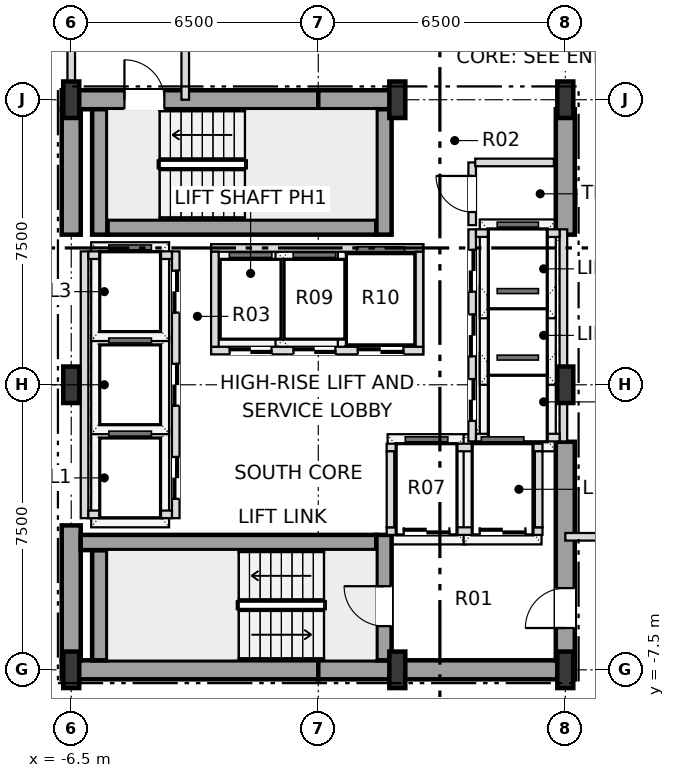
"""IFC4 building model, lengths in metres.
Left out: names, types, materials, properties, quantities, classifications, styles, units other than length and angle.
Written with IfcOpenShell. Run it as: python <this file> out.ifc"""

import sys

from ifc_helpers import new_model, si_unit, direction, frame, frame_2d, origin, origin_2d, place, context, subcontext, project, spatial, rectangle, i_section, extrude, element, fill, save


model = new_model("IFC4")
c1 = context("Model", 3, precision=1e-05, world=origin(), true_north=direction((0.0, 1.0)))
c2 = subcontext(c1, "Body", "Model", "MODEL_VIEW")
j1 = project(units=[si_unit("LENGTHUNIT", "METRE"), si_unit("PLANEANGLEUNIT", "RADIAN")], contexts=[c1])
p1 = place(None, origin())
s1 = spatial("IfcSite", under=j1, at=p1, CompositionType="ELEMENT")
p2 = place(p1, origin())
s2 = spatial("IfcBuilding", under=s1, at=p2, CompositionType="ELEMENT")
p3 = place(p2, origin())
s3 = spatial("IfcBuildingStorey", under=s2, at=p3, CompositionType="ELEMENT", Elevation=0.0)
for number, where, z_axis, x_axis in (
    (1, (-6.5, -7.5, 0.0), (0.0, 0.0, 1.0), (1.0, 0.0, 0.0)),
    (2, (2.08, -7.5, 0.0), (0.0, 0.0, 1.0), (1.0, 0.0, 0.0)),
    (3, (6.5, -7.5, 0.0), (0.0, 0.0, 1.0), (1.0, 0.0, 0.0)),
    (4, (-6.5, 0.0, 0.0), (0.0, 0.0, 1.0), (1.0, 0.0, 0.0)),
    (5, (6.5, 0.0, 0.0), (0.0, 0.0, 1.0), (1.0, 0.0, 0.0)),
    (6, (-6.5, 7.5, 0.0), (0.0, 0.0, 1.0), (1.0, 0.0, 0.0)),
    (7, (2.08, 7.5, 0.0), (0.0, 0.0, 1.0), (1.0, 0.0, 0.0)),
    (8, (6.5, 7.5, 0.0), (0.0, 0.0, 1.0), (1.0, 0.0, 0.0)),
):
    element("IfcColumn", number, at=place(p3, frame(where, z_axis=z_axis, x_axis=x_axis)), inside=s3, PredefinedType="COLUMN", context=c2, shape_type="SweptSolid", body=[
        extrude(i_section(OverallWidth=0.42, OverallDepth=0.96, WebThickness=0.022, FlangeThickness=0.034, at=origin_2d()), origin(), (0.0, 0.0, 1.0), 6.0),
    ])
for number, where, z_axis, x_axis in (
    (9, (-6.75, -7.5, 0.0), (0.0, 0.0, 1.0), (1.0, 0.0, 0.0)),
    (10, (0.0, -7.5, 0.0), (0.0, 0.0, 1.0), (1.0, 0.0, 0.0)),
):
    element("IfcWall", number, at=place(p3, frame(where, z_axis=z_axis, x_axis=x_axis)), inside=s3, PredefinedType="SHEAR", context=c2, shape_type="SweptSolid", body=[
        extrude(rectangle(XDim=6.75, YDim=0.5, at=frame_2d((3.375, 0.0))), origin(), (0.0, 0.0, 1.0), 5.72),
    ])
p4 = place(p3, frame((-6.75, 7.5, 0.0), z_axis=(0.0, 0.0, 1.0), x_axis=(1.0, 0.0, 0.0)))
e11 = element("IfcWall", 11, at=p4, inside=s3, PredefinedType="SHEAR", context=c2, shape_type="SweptSolid", body=[
    extrude(rectangle(XDim=6.75, YDim=0.5, at=frame_2d((3.375, 0.0))), origin(), (0.0, 0.0, 1.0), 5.72),
])
p5 = place(p4, frame((1.65, 0.0, 0.0)))
e12 = element("IfcOpeningElement", 12, at=p5, cuts=e11, PredefinedType="OPENING", context=c2, shape_type="SweptSolid", body=[
    extrude(rectangle(XDim=1.05, YDim=2.15, at=frame_2d((0.525, 1.075))), frame((0.0, 0.26, 0.0), z_axis=(0.0, -1.0, 0.0), x_axis=(1.0, 0.0, 0.0)), (0.0, 0.0, 1.0), 0.52),
])
p6 = place(p3, frame((0.0, 7.5, 0.0), z_axis=(0.0, 0.0, 1.0), x_axis=(1.0, 0.0, 0.0)))
e13 = element("IfcWall", 13, at=p6, inside=s3, PredefinedType="SHEAR", context=c2, shape_type="SweptSolid", body=[
    extrude(rectangle(XDim=2.08, YDim=0.5, at=frame_2d((1.04, 0.0))), origin(), (0.0, 0.0, 1.0), 5.72),
])
p7 = place(p3, frame((-6.5, -7.25, 0.0), z_axis=(0.0, 0.0, 1.0), x_axis=(0.0, 1.0, 0.0)))
e14 = element("IfcWall", 14, at=p7, inside=s3, PredefinedType="SHEAR", context=c2, shape_type="SweptSolid", body=[
    extrude(rectangle(XDim=3.55, YDim=0.5, at=frame_2d((1.775, 0.0))), origin(), (0.0, 0.0, 1.0), 5.72),
])
p8 = place(p3, frame((-6.5, 3.95, 0.0), z_axis=(0.0, 0.0, 1.0), x_axis=(0.0, 1.0, 0.0)))
e15 = element("IfcWall", 15, at=p8, inside=s3, PredefinedType="SHEAR", context=c2, shape_type="SweptSolid", body=[
    extrude(rectangle(XDim=3.3, YDim=0.5, at=frame_2d((1.65, 0.0))), origin(), (0.0, 0.0, 1.0), 5.72),
])
p9 = place(p3, frame((6.5, -7.25, 0.0), z_axis=(0.0, 0.0, 1.0), x_axis=(0.0, 1.0, 0.0)))
e16 = element("IfcWall", 16, at=p9, inside=s3, PredefinedType="SHEAR", context=c2, shape_type="SweptSolid", body=[
    extrude(rectangle(XDim=5.75, YDim=0.5, at=frame_2d((2.875, 0.0))), origin(), (0.0, 0.0, 1.0), 5.72),
])
p10 = place(p9, frame((0.85, 0.0, 0.0)))
e17 = element("IfcOpeningElement", 17, at=p10, cuts=e16, PredefinedType="OPENING", context=c2, shape_type="SweptSolid", body=[
    extrude(rectangle(XDim=1.05, YDim=2.15, at=frame_2d((0.525, 1.075))), frame((0.0, 0.26, 0.0), z_axis=(0.0, -1.0, 0.0), x_axis=(1.0, 0.0, 0.0)), (0.0, 0.0, 1.0), 0.52),
])
p11 = place(p3, frame((6.5, 3.95, 0.0), z_axis=(0.0, 0.0, 1.0), x_axis=(0.0, 1.0, 0.0)))
e18 = element("IfcWall", 18, at=p11, inside=s3, PredefinedType="SHEAR", context=c2, shape_type="SweptSolid", body=[
    extrude(rectangle(XDim=3.3, YDim=0.5, at=frame_2d((1.65, 0.0))), origin(), (0.0, 0.0, 1.0), 5.72),
])
p12 = place(p3, frame((-5.75, -7.25, 0.0), z_axis=(0.0, 0.0, 1.0), x_axis=(0.0, 1.0, 0.0)))
e19 = element("IfcWall", 19, at=p12, inside=s3, PredefinedType="SHEAR", context=c2, shape_type="SweptSolid", body=[
    extrude(rectangle(XDim=2.9, YDim=0.4, at=frame_2d((1.45, 0.0))), origin(), (0.0, 0.0, 1.0), 5.72),
])
p13 = place(p3, frame((-6.25, -4.15, 0.0), z_axis=(0.0, 0.0, 1.0), x_axis=(1.0, 0.0, 0.0)))
e20 = element("IfcWall", 20, at=p13, inside=s3, PredefinedType="SHEAR", context=c2, shape_type="SweptSolid", body=[
    extrude(rectangle(XDim=7.78, YDim=0.4, at=frame_2d((3.89, 0.0))), origin(), (0.0, 0.0, 1.0), 5.72),
])
p14 = place(p3, frame((1.73, -7.25, 0.0), z_axis=(0.0, 0.0, 1.0), x_axis=(0.0, 1.0, 0.0)))
e21 = element("IfcWall", 21, at=p14, inside=s3, PredefinedType="SHEAR", context=c2, shape_type="SweptSolid", body=[
    extrude(rectangle(XDim=3.3, YDim=0.4, at=frame_2d((1.65, 0.0))), origin(), (0.0, 0.0, 1.0), 5.72),
])
p15 = place(p14, frame((0.9, 0.0, 0.0)))
e22 = element("IfcOpeningElement", 22, at=p15, cuts=e21, PredefinedType="OPENING", context=c2, shape_type="SweptSolid", body=[
    extrude(rectangle(XDim=1.05, YDim=2.15, at=frame_2d((0.525, 1.075))), frame((0.0, 0.21, 0.0), z_axis=(0.0, -1.0, 0.0), x_axis=(1.0, 0.0, 0.0)), (0.0, 0.0, 1.0), 0.42),
])
p16 = place(p3, frame((-5.55, 4.15, 0.0), z_axis=(0.0, 0.0, 1.0), x_axis=(1.0, 0.0, 0.0)))
e23 = element("IfcWall", 23, at=p16, inside=s3, PredefinedType="SHEAR", context=c2, shape_type="SweptSolid", body=[
    extrude(rectangle(XDim=7.08, YDim=0.4, at=frame_2d((3.54, 0.0))), origin(), (0.0, 0.0, 1.0), 5.72),
])
for number, where, z_axis, x_axis in (
    (24, (1.73, 3.95, 0.0), (0.0, 0.0, 1.0), (0.0, 1.0, 0.0)),
    (25, (-5.75, 3.95, 0.0), (0.0, 0.0, 1.0), (0.0, 1.0, 0.0)),
):
    element("IfcWall", number, at=place(p3, frame(where, z_axis=z_axis, x_axis=x_axis)), inside=s3, PredefinedType="SHEAR", context=c2, shape_type="SweptSolid", body=[
        extrude(rectangle(XDim=3.3, YDim=0.4, at=frame_2d((1.65, 0.0))), origin(), (0.0, 0.0, 1.0), 5.72),
    ])
p17 = place(p3, frame((-3.75, -3.51, 0.0), z_axis=(0.0, 0.0, 1.0), x_axis=(0.0, 1.0, 0.0)))
e26 = element("IfcWall", 26, at=p17, inside=s3, PredefinedType="SOLIDWALL", context=c2, shape_type="SweptSolid", body=[
    extrude(rectangle(XDim=7.02, YDim=0.2, at=frame_2d((3.51, 0.0))), origin(), (0.0, 0.0, 1.0), 5.72),
])
p18 = place(p17, frame((0.51, 0.0, 0.0)))
e27 = element("IfcOpeningElement", 27, at=p18, cuts=e26, PredefinedType="OPENING", context=c2, shape_type="SweptSolid", body=[
    extrude(rectangle(XDim=1.1, YDim=2.15, at=frame_2d((0.55, 1.075))), frame((0.0, 0.11, 0.0), z_axis=(0.0, -1.0, 0.0), x_axis=(1.0, 0.0, 0.0)), (0.0, 0.0, 1.0), 0.22),
])
p19 = place(p17, frame((2.96, 0.0, 0.0)))
e28 = element("IfcOpeningElement", 28, at=p19, cuts=e26, PredefinedType="OPENING", context=c2, shape_type="SweptSolid", body=[
    extrude(rectangle(XDim=1.1, YDim=2.15, at=frame_2d((0.55, 1.075))), frame((0.0, 0.11, 0.0), z_axis=(0.0, -1.0, 0.0), x_axis=(1.0, 0.0, 0.0)), (0.0, 0.0, 1.0), 0.22),
])
p20 = place(p17, frame((5.41, 0.0, 0.0)))
e29 = element("IfcOpeningElement", 29, at=p20, cuts=e26, PredefinedType="OPENING", context=c2, shape_type="SweptSolid", body=[
    extrude(rectangle(XDim=1.1, YDim=2.15, at=frame_2d((0.55, 1.075))), frame((0.0, 0.11, 0.0), z_axis=(0.0, -1.0, 0.0), x_axis=(1.0, 0.0, 0.0)), (0.0, 0.0, 1.0), 0.22),
])
p21 = place(p3, frame((-6.15, -3.51, 0.0), z_axis=(0.0, 0.0, 1.0), x_axis=(0.0, 1.0, 0.0)))
e30 = element("IfcWall", 30, at=p21, inside=s3, PredefinedType="SOLIDWALL", context=c2, shape_type="SweptSolid", body=[
    extrude(rectangle(XDim=7.02, YDim=0.2, at=frame_2d((3.51, 0.0))), origin(), (0.0, 0.0, 1.0), 5.72),
])
for number, where, z_axis, x_axis in (
    (31, (-6.05, -3.41, 0.0), (0.0, 0.0, 1.0), (1.0, 0.0, 0.0)),
    (32, (-6.05, 3.41, 0.0), (0.0, 0.0, 1.0), (1.0, 0.0, 0.0)),
):
    element("IfcWall", number, at=place(p3, frame(where, z_axis=z_axis, x_axis=x_axis)), inside=s3, PredefinedType="SOLIDWALL", context=c2, shape_type="SweptSolid", body=[
        extrude(rectangle(XDim=2.2, YDim=0.2, at=frame_2d((1.1, 0.0))), origin(), (0.0, 0.0, 1.0), 5.72),
    ])
p22 = place(p3, frame((4.05, -1.49, 0.0), z_axis=(0.0, 0.0, 1.0), x_axis=(0.0, 1.0, 0.0)))
e33 = element("IfcWall", 33, at=p22, inside=s3, PredefinedType="SOLIDWALL", context=c2, shape_type="SweptSolid", body=[
    extrude(rectangle(XDim=5.58, YDim=0.2, at=frame_2d((2.79, 0.0))), origin(), (0.0, 0.0, 1.0), 5.72),
])
p23 = place(p22, frame((0.54, 0.0, 0.0)))
e34 = element("IfcOpeningElement", 34, at=p23, cuts=e33, PredefinedType="OPENING", context=c2, shape_type="SweptSolid", body=[
    extrude(rectangle(XDim=1.1, YDim=2.15, at=frame_2d((0.55, 1.075))), frame((0.0, 0.11, 0.0), z_axis=(0.0, -1.0, 0.0), x_axis=(1.0, 0.0, 0.0)), (0.0, 0.0, 1.0), 0.22),
])
p24 = place(p22, frame((2.24, 0.0, 0.0)))
e35 = element("IfcOpeningElement", 35, at=p24, cuts=e33, PredefinedType="OPENING", context=c2, shape_type="SweptSolid", body=[
    extrude(rectangle(XDim=1.1, YDim=2.15, at=frame_2d((0.55, 1.075))), frame((0.0, 0.11, 0.0), z_axis=(0.0, -1.0, 0.0), x_axis=(1.0, 0.0, 0.0)), (0.0, 0.0, 1.0), 0.22),
])
p25 = place(p22, frame((3.94, 0.0, 0.0)))
e36 = element("IfcOpeningElement", 36, at=p25, cuts=e33, PredefinedType="OPENING", context=c2, shape_type="SweptSolid", body=[
    extrude(rectangle(XDim=1.1, YDim=2.15, at=frame_2d((0.55, 1.075))), frame((0.0, 0.11, 0.0), z_axis=(0.0, -1.0, 0.0), x_axis=(1.0, 0.0, 0.0)), (0.0, 0.0, 1.0), 0.22),
])
p26 = place(p3, frame((6.45, -1.49, 0.0), z_axis=(0.0, 0.0, 1.0), x_axis=(0.0, 1.0, 0.0)))
e37 = element("IfcWall", 37, at=p26, inside=s3, PredefinedType="SOLIDWALL", context=c2, shape_type="SweptSolid", body=[
    extrude(rectangle(XDim=5.58, YDim=0.2, at=frame_2d((2.79, 0.0))), origin(), (0.0, 0.0, 1.0), 5.01),
])
for number, where, z_axis, x_axis in (
    (38, (4.15, -1.39, 0.0), (0.0, 0.0, 1.0), (1.0, 0.0, 0.0)),
    (39, (4.15, 3.99, 0.0), (0.0, 0.0, 1.0), (1.0, 0.0, 0.0)),
):
    element("IfcWall", number, at=place(p3, frame(where, z_axis=z_axis, x_axis=x_axis)), inside=s3, PredefinedType="SOLIDWALL", context=c2, shape_type="SweptSolid", body=[
        extrude(rectangle(XDim=2.2, YDim=0.2, at=frame_2d((1.1, 0.0))), origin(), (0.0, 0.0, 1.0), 5.72),
    ])
p27 = place(p3, frame((-2.82, 0.9, 0.0), z_axis=(0.0, 0.0, 1.0), x_axis=(1.0, 0.0, 0.0)))
e40 = element("IfcWall", 40, at=p27, inside=s3, PredefinedType="SOLIDWALL", context=c2, shape_type="SweptSolid", body=[
    extrude(rectangle(XDim=5.58, YDim=0.2, at=frame_2d((2.79, 0.0))), origin(), (0.0, 0.0, 1.0), 5.72),
])
p28 = place(p27, frame((0.49, 0.0, 0.0)))
e41 = element("IfcOpeningElement", 41, at=p28, cuts=e40, PredefinedType="OPENING", context=c2, shape_type="SweptSolid", body=[
    extrude(rectangle(XDim=1.1, YDim=2.15, at=frame_2d((0.55, 1.075))), frame((0.0, 0.11, 0.0), z_axis=(0.0, -1.0, 0.0), x_axis=(1.0, 0.0, 0.0)), (0.0, 0.0, 1.0), 0.22),
])
p29 = place(p27, frame((2.17, 0.0, 0.0)))
e42 = element("IfcOpeningElement", 42, at=p29, cuts=e40, PredefinedType="OPENING", context=c2, shape_type="SweptSolid", body=[
    extrude(rectangle(XDim=1.1, YDim=2.15, at=frame_2d((0.55, 1.075))), frame((0.0, 0.11, 0.0), z_axis=(0.0, -1.0, 0.0), x_axis=(1.0, 0.0, 0.0)), (0.0, 0.0, 1.0), 0.22),
])
p30 = place(p27, frame((3.86, 0.0, 0.0)))
e43 = element("IfcOpeningElement", 43, at=p30, cuts=e40, PredefinedType="OPENING", context=c2, shape_type="SweptSolid", body=[
    extrude(rectangle(XDim=1.2, YDim=2.2, at=frame_2d((0.6, 1.1))), frame((0.0, 0.11, 0.0), z_axis=(0.0, -1.0, 0.0), x_axis=(1.0, 0.0, 0.0)), (0.0, 0.0, 1.0), 0.22),
])
p31 = place(p3, frame((-2.82, 3.6, 0.0), z_axis=(0.0, 0.0, 1.0), x_axis=(1.0, 0.0, 0.0)))
e44 = element("IfcWall", 44, at=p31, inside=s3, PredefinedType="SOLIDWALL", context=c2, shape_type="SweptSolid", body=[
    extrude(rectangle(XDim=5.58, YDim=0.2, at=frame_2d((2.79, 0.0))), origin(), (0.0, 0.0, 1.0), 5.72),
])
for number, where, z_axis, x_axis in (
    (45, (-2.72, 1.0, 0.0), (0.0, 0.0, 1.0), (0.0, 1.0, 0.0)),
    (46, (2.66, 1.0, 0.0), (0.0, 0.0, 1.0), (0.0, 1.0, 0.0)),
):
    element("IfcWall", number, at=place(p3, frame(where, z_axis=z_axis, x_axis=x_axis)), inside=s3, PredefinedType="SOLIDWALL", context=c2, shape_type="SweptSolid", body=[
        extrude(rectangle(XDim=2.5, YDim=0.2, at=frame_2d((1.25, 0.0))), origin(), (0.0, 0.0, 1.0), 5.72),
    ])
p32 = place(p3, frame((1.8, -3.85, 0.0), z_axis=(0.0, 0.0, 1.0), x_axis=(1.0, 0.0, 0.0)))
e47 = element("IfcWall", 47, at=p32, inside=s3, PredefinedType="SOLIDWALL", context=c2, shape_type="SweptSolid", body=[
    extrude(rectangle(XDim=4.1, YDim=0.2, at=frame_2d((2.05, 0.0))), origin(), (0.0, 0.0, 1.0), 5.72),
])
p33 = place(p32, frame((0.45, 0.0, 0.0)))
e48 = element("IfcOpeningElement", 48, at=p33, cuts=e47, PredefinedType="OPENING", context=c2, shape_type="SweptSolid", body=[
    extrude(rectangle(XDim=1.2, YDim=2.2, at=frame_2d((0.6, 1.1))), frame((0.0, 0.11, 0.0), z_axis=(0.0, -1.0, 0.0), x_axis=(1.0, 0.0, 0.0)), (0.0, 0.0, 1.0), 0.22),
])
p34 = place(p32, frame((2.45, 0.0, 0.0)))
e49 = element("IfcOpeningElement", 49, at=p34, cuts=e47, PredefinedType="OPENING", context=c2, shape_type="SweptSolid", body=[
    extrude(rectangle(XDim=1.2, YDim=2.2, at=frame_2d((0.6, 1.1))), frame((0.0, 0.11, 0.0), z_axis=(0.0, -1.0, 0.0), x_axis=(1.0, 0.0, 0.0)), (0.0, 0.0, 1.0), 0.22),
])
p35 = place(p3, frame((1.8, -1.65, 0.0), z_axis=(0.0, 0.0, 1.0), x_axis=(1.0, 0.0, 0.0)))
e50 = element("IfcWall", 50, at=p35, inside=s3, PredefinedType="SOLIDWALL", context=c2, shape_type="SweptSolid", body=[
    extrude(rectangle(XDim=4.1, YDim=0.2, at=frame_2d((2.05, 0.0))), origin(), (0.0, 0.0, 1.0), 5.72),
])
for number, where, z_axis, x_axis in (
    (51, (1.9, -3.75, 0.0), (0.0, 0.0, 1.0), (0.0, 1.0, 0.0)),
    (52, (5.8, -3.75, 0.0), (0.0, 0.0, 1.0), (0.0, 1.0, 0.0)),
):
    element("IfcWall", number, at=place(p3, frame(where, z_axis=z_axis, x_axis=x_axis)), inside=s3, PredefinedType="SOLIDWALL", context=c2, shape_type="SweptSolid", body=[
        extrude(rectangle(XDim=2.0, YDim=0.2, at=frame_2d((1.0, 0.0))), origin(), (0.0, 0.0, 1.0), 5.72),
    ])
p36 = place(p3, frame((6.5, -4.0, 0.0), z_axis=(0.0, 0.0, 1.0), x_axis=(1.0, 0.0, 0.0)))
e53 = element("IfcWall", 53, at=p36, inside=s3, PredefinedType="SOLIDWALL", context=c2, shape_type="SweptSolid", body=[
    extrude(rectangle(XDim=2.0, YDim=0.2, at=frame_2d((1.0, 0.0))), origin(), (0.0, 0.0, 1.0), 5.01),
])
for number, where, z_axis, x_axis in (
    (54, (-6.5, 7.5, 0.0), (0.0, 0.0, 1.0), (0.0, 1.0, 0.0)),
    (55, (-3.5, 7.5, 0.0), (0.0, 0.0, 1.0), (0.0, 1.0, 0.0)),
):
    element("IfcWall", number, at=place(p3, frame(where, z_axis=z_axis, x_axis=x_axis)), inside=s3, PredefinedType="SOLIDWALL", context=c2, shape_type="SweptSolid", body=[
        extrude(rectangle(XDim=8.0, YDim=0.2, at=frame_2d((4.0, 0.0))), origin(), (0.0, 0.0, 1.0), 5.01),
    ])
p37 = place(p3, frame((4.05, 4.2, 0.0), z_axis=(0.0, 0.0, 1.0), x_axis=(0.0, 1.0, 0.0)))
e56 = element("IfcWall", 56, at=p37, inside=s3, PredefinedType="SOLIDWALL", context=c2, shape_type="SweptSolid", body=[
    extrude(rectangle(XDim=1.65, YDim=0.2, at=frame_2d((0.825, 0.0))), origin(), (0.0, 0.0, 1.0), 5.72),
])
p38 = place(p37, frame((0.345, 0.0, 0.0)))
e57 = element("IfcOpeningElement", 57, at=p38, cuts=e56, PredefinedType="OPENING", context=c2, shape_type="SweptSolid", body=[
    extrude(rectangle(XDim=0.95, YDim=2.15, at=frame_2d((0.475, 1.075))), frame((0.0, 0.11, 0.0), z_axis=(0.0, -1.0, 0.0), x_axis=(1.0, 0.0, 0.0)), (0.0, 0.0, 1.0), 0.22),
])
p39 = place(p3, frame((4.13, 5.85, 0.0), z_axis=(0.0, 0.0, 1.0), x_axis=(1.0, 0.0, 0.0)))
e58 = element("IfcWall", 58, at=p39, inside=s3, PredefinedType="SOLIDWALL", context=c2, shape_type="SweptSolid", body=[
    extrude(rectangle(XDim=2.07, YDim=0.2, at=frame_2d((1.035, 0.0))), origin(), (0.0, 0.0, 1.0), 5.72),
])
p40 = place(p10, origin())
e59 = element("IfcDoor", 59, at=p40, inside=s3, OperationType="SINGLE_SWING_LEFT", PredefinedType="DOOR", context=c2, shape_type="SweptSolid", body=[
    extrude(rectangle(XDim=1.05, YDim=2.15, at=frame_2d((0.525, 1.075))), frame((0.0, 0.025, 0.0), z_axis=(0.0, -1.0, 0.0), x_axis=(1.0, 0.0, 0.0)), (0.0, 0.0, 1.0), 0.05),
])
fill(e17, e59)
p41 = place(p15, origin())
e60 = element("IfcDoor", 60, at=p41, inside=s3, OperationType="SINGLE_SWING_RIGHT", PredefinedType="DOOR", context=c2, shape_type="SweptSolid", body=[
    extrude(rectangle(XDim=1.05, YDim=2.15, at=frame_2d((0.525, 1.075))), frame((0.0, 0.025, 0.0), z_axis=(0.0, -1.0, 0.0), x_axis=(1.0, 0.0, 0.0)), (0.0, 0.0, 1.0), 0.05),
])
fill(e22, e60)
p42 = place(p5, origin())
e61 = element("IfcDoor", 61, at=p42, inside=s3, OperationType="SINGLE_SWING_LEFT", PredefinedType="DOOR", context=c2, shape_type="SweptSolid", body=[
    extrude(rectangle(XDim=1.05, YDim=2.15, at=frame_2d((0.525, 1.075))), frame((0.0, 0.025, 0.0), z_axis=(0.0, -1.0, 0.0), x_axis=(1.0, 0.0, 0.0)), (0.0, 0.0, 1.0), 0.05),
])
fill(e12, e61)
p43 = place(p18, origin())
e62 = element("IfcDoor", 62, at=p43, inside=s3, OperationType="DOUBLE_DOOR_SLIDING", PredefinedType="DOOR", context=c2, shape_type="SweptSolid", body=[
    extrude(rectangle(XDim=1.1, YDim=2.15, at=frame_2d((0.55, 1.075))), frame((0.0, 0.025, 0.0), z_axis=(0.0, -1.0, 0.0), x_axis=(1.0, 0.0, 0.0)), (0.0, 0.0, 1.0), 0.05),
])
fill(e27, e62)
p44 = place(p19, origin())
e63 = element("IfcDoor", 63, at=p44, inside=s3, OperationType="DOUBLE_DOOR_SLIDING", PredefinedType="DOOR", context=c2, shape_type="SweptSolid", body=[
    extrude(rectangle(XDim=1.1, YDim=2.15, at=frame_2d((0.55, 1.075))), frame((0.0, 0.025, 0.0), z_axis=(0.0, -1.0, 0.0), x_axis=(1.0, 0.0, 0.0)), (0.0, 0.0, 1.0), 0.05),
])
fill(e28, e63)
p45 = place(p20, origin())
e64 = element("IfcDoor", 64, at=p45, inside=s3, OperationType="DOUBLE_DOOR_SLIDING", PredefinedType="DOOR", context=c2, shape_type="SweptSolid", body=[
    extrude(rectangle(XDim=1.1, YDim=2.15, at=frame_2d((0.55, 1.075))), frame((0.0, 0.025, 0.0), z_axis=(0.0, -1.0, 0.0), x_axis=(1.0, 0.0, 0.0)), (0.0, 0.0, 1.0), 0.05),
])
fill(e29, e64)
p46 = place(p23, origin())
e65 = element("IfcDoor", 65, at=p46, inside=s3, OperationType="DOUBLE_DOOR_SLIDING", PredefinedType="DOOR", context=c2, shape_type="SweptSolid", body=[
    extrude(rectangle(XDim=1.1, YDim=2.15, at=frame_2d((0.55, 1.075))), frame((0.0, 0.025, 0.0), z_axis=(0.0, -1.0, 0.0), x_axis=(1.0, 0.0, 0.0)), (0.0, 0.0, 1.0), 0.05),
])
fill(e34, e65)
p47 = place(p24, origin())
e66 = element("IfcDoor", 66, at=p47, inside=s3, OperationType="DOUBLE_DOOR_SLIDING", PredefinedType="DOOR", context=c2, shape_type="SweptSolid", body=[
    extrude(rectangle(XDim=1.1, YDim=2.15, at=frame_2d((0.55, 1.075))), frame((0.0, 0.025, 0.0), z_axis=(0.0, -1.0, 0.0), x_axis=(1.0, 0.0, 0.0)), (0.0, 0.0, 1.0), 0.05),
])
fill(e35, e66)
p48 = place(p25, origin())
e67 = element("IfcDoor", 67, at=p48, inside=s3, OperationType="DOUBLE_DOOR_SLIDING", PredefinedType="DOOR", context=c2, shape_type="SweptSolid", body=[
    extrude(rectangle(XDim=1.1, YDim=2.15, at=frame_2d((0.55, 1.075))), frame((0.0, 0.025, 0.0), z_axis=(0.0, -1.0, 0.0), x_axis=(1.0, 0.0, 0.0)), (0.0, 0.0, 1.0), 0.05),
])
fill(e36, e67)
p49 = place(p28, origin())
e68 = element("IfcDoor", 68, at=p49, inside=s3, OperationType="DOUBLE_DOOR_SLIDING", PredefinedType="DOOR", context=c2, shape_type="SweptSolid", body=[
    extrude(rectangle(XDim=1.1, YDim=2.15, at=frame_2d((0.55, 1.075))), frame((0.0, 0.025, 0.0), z_axis=(0.0, -1.0, 0.0), x_axis=(1.0, 0.0, 0.0)), (0.0, 0.0, 1.0), 0.05),
])
fill(e41, e68)
p50 = place(p29, origin())
e69 = element("IfcDoor", 69, at=p50, inside=s3, OperationType="DOUBLE_DOOR_SLIDING", PredefinedType="DOOR", context=c2, shape_type="SweptSolid", body=[
    extrude(rectangle(XDim=1.1, YDim=2.15, at=frame_2d((0.55, 1.075))), frame((0.0, 0.025, 0.0), z_axis=(0.0, -1.0, 0.0), x_axis=(1.0, 0.0, 0.0)), (0.0, 0.0, 1.0), 0.05),
])
fill(e42, e69)
p51 = place(p30, origin())
e70 = element("IfcDoor", 70, at=p51, inside=s3, OperationType="DOUBLE_DOOR_SLIDING", PredefinedType="DOOR", context=c2, shape_type="SweptSolid", body=[
    extrude(rectangle(XDim=1.2, YDim=2.2, at=frame_2d((0.6, 1.1))), frame((0.0, 0.025, 0.0), z_axis=(0.0, -1.0, 0.0), x_axis=(1.0, 0.0, 0.0)), (0.0, 0.0, 1.0), 0.05),
])
fill(e43, e70)
p52 = place(p33, origin())
e71 = element("IfcDoor", 71, at=p52, inside=s3, OperationType="DOUBLE_DOOR_SLIDING", PredefinedType="DOOR", context=c2, shape_type="SweptSolid", body=[
    extrude(rectangle(XDim=1.2, YDim=2.2, at=frame_2d((0.6, 1.1))), frame((0.0, 0.025, 0.0), z_axis=(0.0, -1.0, 0.0), x_axis=(1.0, 0.0, 0.0)), (0.0, 0.0, 1.0), 0.05),
])
fill(e48, e71)
p53 = place(p34, origin())
e72 = element("IfcDoor", 72, at=p53, inside=s3, OperationType="DOUBLE_DOOR_SLIDING", PredefinedType="DOOR", context=c2, shape_type="SweptSolid", body=[
    extrude(rectangle(XDim=1.2, YDim=2.2, at=frame_2d((0.6, 1.1))), frame((0.0, 0.025, 0.0), z_axis=(0.0, -1.0, 0.0), x_axis=(1.0, 0.0, 0.0)), (0.0, 0.0, 1.0), 0.05),
])
fill(e49, e72)
p54 = place(p38, origin())
e73 = element("IfcDoor", 73, at=p54, inside=s3, OperationType="SINGLE_SWING_RIGHT", PredefinedType="DOOR", context=c2, shape_type="SweptSolid", body=[
    extrude(rectangle(XDim=0.95, YDim=2.15, at=frame_2d((0.475, 1.075))), frame((0.0, 0.025, 0.0), z_axis=(0.0, -1.0, 0.0), x_axis=(1.0, 0.0, 0.0)), (0.0, 0.0, 1.0), 0.05),
])
fill(e57, e73)
save(model, sys.argv[1])
